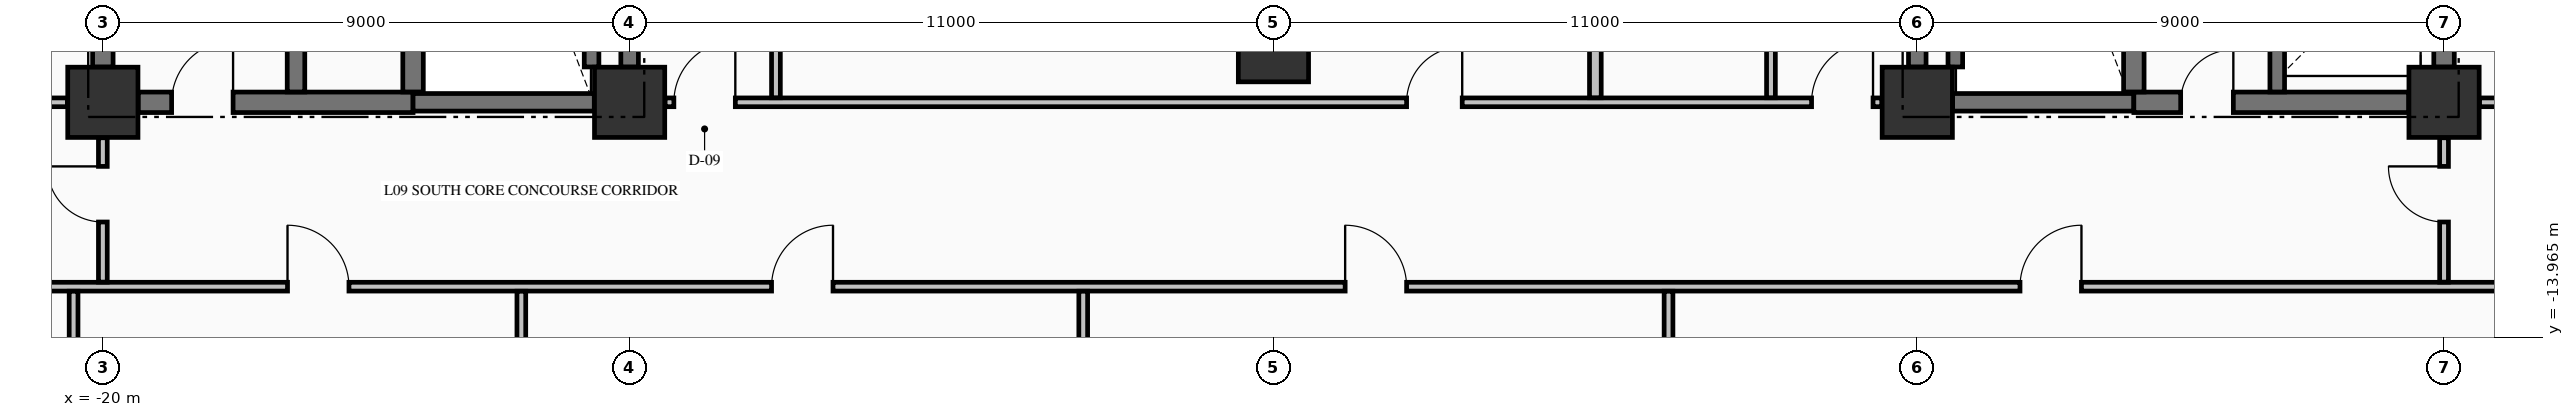
"""IFC4 building model, lengths in metres.
Left out: names, types, materials, properties, quantities, classifications, styles, units other than length and angle.
Written with IfcOpenShell. Run it as: python <this file> out.ifc"""

import sys

from ifc_helpers import new_model, si_unit, direction, frame, frame_2d, origin, origin_2d, place, context, subcontext, project, spatial, rectangle, extrude, element, fill, save


model = new_model("IFC4")
c1 = context("Model", 3, precision=1e-05, world=origin(), true_north=direction((0.0, 1.0)))
c2 = subcontext(c1, "Body", "Model", "MODEL_VIEW")
j1 = project(units=[si_unit("LENGTHUNIT", "METRE"), si_unit("PLANEANGLEUNIT", "RADIAN")], contexts=[c1])
p1 = place(None, origin())
s1 = spatial("IfcSite", under=j1, at=p1, CompositionType="ELEMENT")
p2 = place(p1, origin())
s2 = spatial("IfcBuilding", under=s1, at=p2, CompositionType="ELEMENT")
p3 = place(p2, frame((0.0, 0.0, 41.48)))
s3 = spatial("IfcBuildingStorey", under=s2, at=p3, CompositionType="ELEMENT", Elevation=41.48)
for number, where, z_axis, x_axis in (
    (1, (-20.0, -9.95, -0.25), (0.0, 0.0, 1.0), (1.0, 0.0, 0.0)),
    (2, (-11.0, -9.95, -0.25), (0.0, 0.0, 1.0), (1.0, 0.0, 0.0)),
    (3, (11.0, -9.95, -0.25), (0.0, 0.0, 1.0), (1.0, 0.0, 0.0)),
    (4, (20.0, -9.95, -0.25), (0.0, 0.0, 1.0), (1.0, 0.0, 0.0)),
    (5, (0.0, -9.0, -0.25), (0.0, 0.0, 1.0), (1.0, 0.0, 0.0)),
):
    element("IfcColumn", number, at=place(p3, frame(where, z_axis=z_axis, x_axis=x_axis)), inside=s3, PredefinedType="COLUMN", context=c2, shape_type="SweptSolid", body=[
        extrude(rectangle(XDim=1.2, YDim=1.2, at=origin_2d()), origin(), (0.0, 0.0, 1.0), 3.57),
    ])
p4 = place(p3, frame((-19.396, -9.95, 0.0), z_axis=(0.0, 0.0, 1.0), x_axis=(1.0, 0.0, 0.0)))
e6 = element("IfcWall", 6, at=p4, inside=s3, PredefinedType="SHEAR", context=c2, shape_type="SweptSolid", body=[
    extrude(rectangle(XDim=4.696, YDim=0.35, at=frame_2d((2.348, 0.0))), origin(), (0.0, 0.0, 1.0), 3.32),
])
p5 = place(p4, frame((0.571, 0.0, 0.0)))
e7 = element("IfcOpeningElement", 7, at=p5, cuts=e6, PredefinedType="OPENING", context=c2, shape_type="SweptSolid", body=[
    extrude(rectangle(XDim=1.05, YDim=2.15, at=frame_2d((0.525, 1.075))), frame((0.0, 0.185, 0.0), z_axis=(0.0, -1.0, 0.0), x_axis=(1.0, 0.0, 0.0)), (0.0, 0.0, 1.0), 0.37),
])
for number, where, z_axis, x_axis in (
    (8, (-14.7, -9.95, 0.0), (0.0, 0.0, 1.0), (1.0, 0.0, 0.0)),
    (9, (11.604, -9.95, 0.0), (0.0, 0.0, 1.0), (1.0, 0.0, 0.0)),
):
    element("IfcWall", number, at=place(p3, frame(where, z_axis=z_axis, x_axis=x_axis)), inside=s3, PredefinedType="SHEAR", context=c2, shape_type="SweptSolid", body=[
        extrude(rectangle(XDim=3.096, YDim=0.3, at=frame_2d((1.548, 0.0))), origin(), (0.0, 0.0, 1.0), 3.32),
    ])
p6 = place(p3, frame((14.7, -9.95, 0.0), z_axis=(0.0, 0.0, 1.0), x_axis=(1.0, 0.0, 0.0)))
e10 = element("IfcWall", 10, at=p6, inside=s3, PredefinedType="SHEAR", context=c2, shape_type="SweptSolid", body=[
    extrude(rectangle(XDim=4.696, YDim=0.35, at=frame_2d((2.348, 0.0))), origin(), (0.0, 0.0, 1.0), 3.32),
])
p7 = place(p6, frame((0.8, 0.0, 0.0)))
e11 = element("IfcOpeningElement", 11, at=p7, cuts=e10, PredefinedType="OPENING", context=c2, shape_type="SweptSolid", body=[
    extrude(rectangle(XDim=0.9, YDim=2.15, at=frame_2d((0.45, 1.075))), frame((0.0, 0.185, 0.0), z_axis=(0.0, -1.0, 0.0), x_axis=(1.0, 0.0, 0.0)), (0.0, 0.0, 1.0), 0.37),
])
p8 = place(p3, frame((-23.835, -13.1, 0.0), z_axis=(0.0, 0.0, 1.0), x_axis=(1.0, 0.0, 0.0)))
e12 = element("IfcWall", 12, at=p8, inside=s3, PredefinedType="PARTITIONING", context=c2, shape_type="SweptSolid", body=[
    extrude(rectangle(XDim=52.67, YDim=0.15, at=frame_2d((26.335, 0.0))), origin(), (0.0, 0.0, 1.0), 3.32),
])
p9 = place(p8, frame((6.99, 0.0, 0.0)))
e13 = element("IfcOpeningElement", 13, at=p9, cuts=e12, PredefinedType="OPENING", context=c2, shape_type="SweptSolid", body=[
    extrude(rectangle(XDim=1.05, YDim=2.15, at=frame_2d((0.525, 1.075))), frame((0.0, 0.085, 0.0), z_axis=(0.0, -1.0, 0.0), x_axis=(1.0, 0.0, 0.0)), (0.0, 0.0, 1.0), 0.17),
])
p10 = place(p8, frame((15.26, 0.0, 0.0)))
e14 = element("IfcOpeningElement", 14, at=p10, cuts=e12, PredefinedType="OPENING", context=c2, shape_type="SweptSolid", body=[
    extrude(rectangle(XDim=1.05, YDim=2.15, at=frame_2d((0.525, 1.075))), frame((0.0, 0.085, 0.0), z_axis=(0.0, -1.0, 0.0), x_axis=(1.0, 0.0, 0.0)), (0.0, 0.0, 1.0), 0.17),
])
p11 = place(p8, frame((25.06, 0.0, 0.0)))
e15 = element("IfcOpeningElement", 15, at=p11, cuts=e12, PredefinedType="OPENING", context=c2, shape_type="SweptSolid", body=[
    extrude(rectangle(XDim=1.05, YDim=2.15, at=frame_2d((0.525, 1.075))), frame((0.0, 0.085, 0.0), z_axis=(0.0, -1.0, 0.0), x_axis=(1.0, 0.0, 0.0)), (0.0, 0.0, 1.0), 0.17),
])
p12 = place(p8, frame((36.59, 0.0, 0.0)))
e16 = element("IfcOpeningElement", 16, at=p12, cuts=e12, PredefinedType="OPENING", context=c2, shape_type="SweptSolid", body=[
    extrude(rectangle(XDim=1.05, YDim=2.15, at=frame_2d((0.525, 1.075))), frame((0.0, 0.085, 0.0), z_axis=(0.0, -1.0, 0.0), x_axis=(1.0, 0.0, 0.0)), (0.0, 0.0, 1.0), 0.17),
])
p13 = place(p3, frame((-23.835, -9.95, 0.0), z_axis=(0.0, 0.0, 1.0), x_axis=(1.0, 0.0, 0.0)))
e17 = element("IfcWall", 17, at=p13, inside=s3, PredefinedType="PARTITIONING", context=c2, shape_type="SweptSolid", body=[
    extrude(rectangle(XDim=3.229, YDim=0.15, at=frame_2d((1.615, 0.0))), origin(), (0.0, 0.0, 1.0), 3.32),
])
p14 = place(p13, frame((1.36, 0.0, 0.0)))
e18 = element("IfcOpeningElement", 18, at=p14, cuts=e17, PredefinedType="OPENING", context=c2, shape_type="SweptSolid", body=[
    extrude(rectangle(XDim=0.95, YDim=2.15, at=frame_2d((0.475, 1.075))), frame((0.0, 0.085, 0.0), z_axis=(0.0, -1.0, 0.0), x_axis=(1.0, 0.0, 0.0)), (0.0, 0.0, 1.0), 0.17),
])
p15 = place(p3, frame((-10.394, -9.95, 0.0), z_axis=(0.0, 0.0, 1.0), x_axis=(1.0, 0.0, 0.0)))
e19 = element("IfcWall", 19, at=p15, inside=s3, PredefinedType="PARTITIONING", context=c2, shape_type="SweptSolid", body=[
    extrude(rectangle(XDim=20.788, YDim=0.15, at=frame_2d((10.394, 0.0))), origin(), (0.0, 0.0, 1.0), 3.32),
])
p16 = place(p15, frame((0.15, 0.0, 0.0)))
e20 = element("IfcOpeningElement", 20, at=p16, cuts=e19, PredefinedType="OPENING", context=c2, shape_type="SweptSolid", body=[
    extrude(rectangle(XDim=1.05, YDim=2.15, at=frame_2d((0.525, 1.075))), frame((0.0, 0.085, 0.0), z_axis=(0.0, -1.0, 0.0), x_axis=(1.0, 0.0, 0.0)), (0.0, 0.0, 1.0), 0.17),
])
p17 = place(p15, frame((19.588, 0.0, 0.0)))
e21 = element("IfcOpeningElement", 21, at=p17, cuts=e19, PredefinedType="OPENING", context=c2, shape_type="SweptSolid", body=[
    extrude(rectangle(XDim=1.05, YDim=2.15, at=frame_2d((0.525, 1.075))), frame((0.0, 0.085, 0.0), z_axis=(0.0, -1.0, 0.0), x_axis=(1.0, 0.0, 0.0)), (0.0, 0.0, 1.0), 0.17),
])
p18 = place(p15, frame((12.669, 0.0, 0.0)))
e22 = element("IfcOpeningElement", 22, at=p18, cuts=e19, PredefinedType="OPENING", context=c2, shape_type="SweptSolid", body=[
    extrude(rectangle(XDim=0.95, YDim=2.15, at=frame_2d((0.475, 1.075))), frame((0.0, 0.085, 0.0), z_axis=(0.0, -1.0, 0.0), x_axis=(1.0, 0.0, 0.0)), (0.0, 0.0, 1.0), 0.17),
])
p19 = place(p3, frame((20.606, -9.95, 0.0), z_axis=(0.0, 0.0, 1.0), x_axis=(1.0, 0.0, 0.0)))
e23 = element("IfcWall", 23, at=p19, inside=s3, PredefinedType="PARTITIONING", context=c2, shape_type="SweptSolid", body=[
    extrude(rectangle(XDim=8.229, YDim=0.15, at=frame_2d((4.115, 0.0))), origin(), (0.0, 0.0, 1.0), 3.32),
])
p20 = place(p19, frame((3.394, 0.0, 0.0)))
e24 = element("IfcOpeningElement", 24, at=p20, cuts=e23, PredefinedType="OPENING", context=c2, shape_type="SweptSolid", body=[
    extrude(rectangle(XDim=1.0, YDim=2.15, at=frame_2d((0.5, 1.075))), frame((0.0, 0.085, 0.0), z_axis=(0.0, -1.0, 0.0), x_axis=(1.0, 0.0, 0.0)), (0.0, 0.0, 1.0), 0.17),
])
p21 = place(p3, frame((-20.0, -9.346, 0.0), z_axis=(0.0, 0.0, 1.0), x_axis=(0.0, 1.0, 0.0)))
e25 = element("IfcWall", 25, at=p21, inside=s3, PredefinedType="SHEAR", context=c2, shape_type="SweptSolid", body=[
    extrude(rectangle(XDim=8.742, YDim=0.35, at=frame_2d((4.371, 0.0))), origin(), (0.0, 0.0, 1.0), 3.32),
])
p22 = place(p3, frame((-16.7, -9.773, 0.0), z_axis=(0.0, 0.0, 1.0), x_axis=(0.0, 1.0, 0.0)))
e26 = element("IfcWall", 26, at=p22, inside=s3, PredefinedType="SHEAR", context=c2, shape_type="SweptSolid", body=[
    extrude(rectangle(XDim=9.371, YDim=0.3, at=frame_2d((4.686, 0.0))), origin(), (0.0, 0.0, 1.0), 3.32),
])
p23 = place(p3, frame((-14.7, -9.773, 0.0), z_axis=(0.0, 0.0, 1.0), x_axis=(0.0, 1.0, 0.0)))
e27 = element("IfcWall", 27, at=p23, inside=s3, PredefinedType="SHEAR", context=c2, shape_type="SweptSolid", body=[
    extrude(rectangle(XDim=9.371, YDim=0.35, at=frame_2d((4.686, 0.0))), origin(), (0.0, 0.0, 1.0), 3.32),
])
p24 = place(p3, frame((-11.65, -9.346, 0.0), z_axis=(0.0, 0.0, 1.0), x_axis=(0.0, 1.0, 0.0)))
e28 = element("IfcWall", 28, at=p24, inside=s3, PredefinedType="SOLIDWALL", context=c2, shape_type="SweptSolid", body=[
    extrude(rectangle(XDim=8.742, YDim=0.25, at=frame_2d((4.371, 0.0))), origin(), (0.0, 0.0, 1.0), 3.32),
])
for number, where, z_axis, x_axis in (
    (29, (-11.0, -9.346, 0.0), (0.0, 0.0, 1.0), (0.0, 1.0, 0.0)),
    (30, (11.0, -9.346, 0.0), (0.0, 0.0, 1.0), (0.0, 1.0, 0.0)),
):
    element("IfcWall", number, at=place(p3, frame(where, z_axis=z_axis, x_axis=x_axis)), inside=s3, PredefinedType="SHEAR", context=c2, shape_type="SweptSolid", body=[
        extrude(rectangle(XDim=8.742, YDim=0.3, at=frame_2d((4.371, 0.0))), origin(), (0.0, 0.0, 1.0), 3.32),
    ])
p25 = place(p3, frame((11.65, -9.346, 0.0), z_axis=(0.0, 0.0, 1.0), x_axis=(0.0, 1.0, 0.0)))
e31 = element("IfcWall", 31, at=p25, inside=s3, PredefinedType="SOLIDWALL", context=c2, shape_type="SweptSolid", body=[
    extrude(rectangle(XDim=8.742, YDim=0.25, at=frame_2d((4.371, 0.0))), origin(), (0.0, 0.0, 1.0), 3.32),
])
p26 = place(p3, frame((14.7, -9.773, 0.0), z_axis=(0.0, 0.0, 1.0), x_axis=(0.0, 1.0, 0.0)))
e32 = element("IfcWall", 32, at=p26, inside=s3, PredefinedType="SHEAR", context=c2, shape_type="SweptSolid", body=[
    extrude(rectangle(XDim=9.371, YDim=0.35, at=frame_2d((4.686, 0.0))), origin(), (0.0, 0.0, 1.0), 3.32),
])
p27 = place(p3, frame((17.15, -9.773, 0.0), z_axis=(0.0, 0.0, 1.0), x_axis=(0.0, 1.0, 0.0)))
e33 = element("IfcWall", 33, at=p27, inside=s3, PredefinedType="SOLIDWALL", context=c2, shape_type="SweptSolid", body=[
    extrude(rectangle(XDim=2.596, YDim=0.25, at=frame_2d((1.298, 0.0))), origin(), (0.0, 0.0, 1.0), 3.32),
])
p28 = place(p3, frame((20.0, -9.346, 0.0), z_axis=(0.0, 0.0, 1.0), x_axis=(0.0, 1.0, 0.0)))
e34 = element("IfcWall", 34, at=p28, inside=s3, PredefinedType="SHEAR", context=c2, shape_type="SweptSolid", body=[
    extrude(rectangle(XDim=2.169, YDim=0.35, at=frame_2d((1.084, 0.0))), origin(), (0.0, 0.0, 1.0), 3.32),
])
p29 = place(p3, frame((-20.5, -22.294, 0.0), z_axis=(0.0, 0.0, 1.0), x_axis=(0.0, 1.0, 0.0)))
e35 = element("IfcWall", 35, at=p29, inside=s3, PredefinedType="PARTITIONING", context=c2, shape_type="SweptSolid", body=[
    extrude(rectangle(XDim=9.116, YDim=0.15, at=frame_2d((4.558, 0.0))), origin(), (0.0, 0.0, 1.0), 3.32),
])
p30 = place(p3, frame((-20.0, -13.022, 0.0), z_axis=(0.0, 0.0, 1.0), x_axis=(0.0, 1.0, 0.0)))
e36 = element("IfcWall", 36, at=p30, inside=s3, PredefinedType="PARTITIONING", context=c2, shape_type="SweptSolid", body=[
    extrude(rectangle(XDim=2.466, YDim=0.15, at=frame_2d((1.233, 0.0))), origin(), (0.0, 0.0, 1.0), 3.32),
])
p31 = place(p30, frame((1.027, 0.0, 0.0)))
e37 = element("IfcOpeningElement", 37, at=p31, cuts=e36, PredefinedType="OPENING", context=c2, shape_type="SweptSolid", body=[
    extrude(rectangle(XDim=0.95, YDim=2.15, at=frame_2d((0.475, 1.075))), frame((0.0, 0.085, 0.0), z_axis=(0.0, -1.0, 0.0), x_axis=(1.0, 0.0, 0.0)), (0.0, 0.0, 1.0), 0.17),
])
p32 = place(p3, frame((-12.85, -26.335, 0.0), z_axis=(0.0, 0.0, 1.0), x_axis=(0.0, 1.0, 0.0)))
e38 = element("IfcWall", 38, at=p32, inside=s3, PredefinedType="PARTITIONING", context=c2, shape_type="SweptSolid", body=[
    extrude(rectangle(XDim=13.157, YDim=0.15, at=frame_2d((6.579, 0.0))), origin(), (0.0, 0.0, 1.0), 3.32),
])
p33 = place(p3, frame((-8.5, -9.872, 0.0), z_axis=(0.0, 0.0, 1.0), x_axis=(0.0, 1.0, 0.0)))
e39 = element("IfcWall", 39, at=p33, inside=s3, PredefinedType="PARTITIONING", context=c2, shape_type="SweptSolid", body=[
    extrude(rectangle(XDim=13.369, YDim=0.15, at=frame_2d((6.685, 0.0))), origin(), (0.0, 0.0, 1.0), 3.32),
])
p34 = place(p33, frame((6.227, 0.0, 0.0)))
e40 = element("IfcOpeningElement", 40, at=p34, cuts=e39, PredefinedType="OPENING", context=c2, shape_type="SweptSolid", body=[
    extrude(rectangle(XDim=0.95, YDim=2.15, at=frame_2d((0.475, 1.075))), frame((0.0, 0.085, 0.0), z_axis=(0.0, -1.0, 0.0), x_axis=(1.0, 0.0, 0.0)), (0.0, 0.0, 1.0), 0.17),
])
p35 = place(p3, frame((-3.25, -26.335, 0.0), z_axis=(0.0, 0.0, 1.0), x_axis=(0.0, 1.0, 0.0)))
e41 = element("IfcWall", 41, at=p35, inside=s3, PredefinedType="PARTITIONING", context=c2, shape_type="SweptSolid", body=[
    extrude(rectangle(XDim=13.157, YDim=0.15, at=frame_2d((6.579, 0.0))), origin(), (0.0, 0.0, 1.0), 3.32),
])
p36 = place(p3, frame((5.5, -9.872, 0.0), z_axis=(0.0, 0.0, 1.0), x_axis=(0.0, 1.0, 0.0)))
e42 = element("IfcWall", 42, at=p36, inside=s3, PredefinedType="PARTITIONING", context=c2, shape_type="SweptSolid", body=[
    extrude(rectangle(XDim=4.969, YDim=0.2, at=frame_2d((2.484, 0.0))), origin(), (0.0, 0.0, 1.0), 3.32),
])
p37 = place(p3, frame((6.75, -26.335, 0.0), z_axis=(0.0, 0.0, 1.0), x_axis=(0.0, 1.0, 0.0)))
e43 = element("IfcWall", 43, at=p37, inside=s3, PredefinedType="PARTITIONING", context=c2, shape_type="SweptSolid", body=[
    extrude(rectangle(XDim=13.157, YDim=0.15, at=frame_2d((6.579, 0.0))), origin(), (0.0, 0.0, 1.0), 3.32),
])
p38 = place(p3, frame((8.5, -9.872, 0.0), z_axis=(0.0, 0.0, 1.0), x_axis=(0.0, 1.0, 0.0)))
e44 = element("IfcWall", 44, at=p38, inside=s3, PredefinedType="PARTITIONING", context=c2, shape_type="SweptSolid", body=[
    extrude(rectangle(XDim=4.969, YDim=0.15, at=frame_2d((2.484, 0.0))), origin(), (0.0, 0.0, 1.0), 3.32),
])
p39 = place(p38, frame((1.997, 0.0, 0.0)))
e45 = element("IfcOpeningElement", 45, at=p39, cuts=e44, PredefinedType="OPENING", context=c2, shape_type="SweptSolid", body=[
    extrude(rectangle(XDim=0.95, YDim=2.15, at=frame_2d((0.475, 1.075))), frame((0.0, 0.085, 0.0), z_axis=(0.0, -1.0, 0.0), x_axis=(1.0, 0.0, 0.0)), (0.0, 0.0, 1.0), 0.17),
])
p40 = place(p3, frame((20.0, -13.022, 0.0), z_axis=(0.0, 0.0, 1.0), x_axis=(0.0, 1.0, 0.0)))
e46 = element("IfcWall", 46, at=p40, inside=s3, PredefinedType="PARTITIONING", context=c2, shape_type="SweptSolid", body=[
    extrude(rectangle(XDim=2.466, YDim=0.15, at=frame_2d((1.233, 0.0))), origin(), (0.0, 0.0, 1.0), 2.66),
])
p41 = place(p40, frame((1.027, 0.0, 0.0)))
e47 = element("IfcOpeningElement", 47, at=p41, cuts=e46, PredefinedType="OPENING", context=c2, shape_type="SweptSolid", body=[
    extrude(rectangle(XDim=0.95, YDim=2.15, at=frame_2d((0.475, 1.075))), frame((0.0, 0.085, 0.0), z_axis=(0.0, -1.0, 0.0), x_axis=(1.0, 0.0, 0.0)), (0.0, 0.0, 1.0), 0.17),
])
p42 = place(p5, origin())
e48 = element("IfcDoor", 48, at=p42, inside=s3, OperationType="SINGLE_SWING_RIGHT", PredefinedType="DOOR", context=c2, shape_type="SweptSolid", body=[
    extrude(rectangle(XDim=1.05, YDim=2.15, at=frame_2d((0.525, 1.075))), frame((0.0, 0.025, 0.0), z_axis=(0.0, -1.0, 0.0), x_axis=(1.0, 0.0, 0.0)), (0.0, 0.0, 1.0), 0.05),
])
fill(e7, e48)
p43 = place(p7, origin())
e49 = element("IfcDoor", 49, at=p43, inside=s3, OperationType="SINGLE_SWING_RIGHT", PredefinedType="DOOR", context=c2, shape_type="SweptSolid", body=[
    extrude(rectangle(XDim=0.9, YDim=2.15, at=frame_2d((0.45, 1.075))), frame((0.0, 0.025, 0.0), z_axis=(0.0, -1.0, 0.0), x_axis=(1.0, 0.0, 0.0)), (0.0, 0.0, 1.0), 0.05),
])
fill(e11, e49)
p44 = place(p16, origin())
e50 = element("IfcDoor", 50, at=p44, inside=s3, OperationType="SINGLE_SWING_RIGHT", PredefinedType="DOOR", context=c2, shape_type="SweptSolid", body=[
    extrude(rectangle(XDim=1.05, YDim=2.15, at=frame_2d((0.525, 1.075))), frame((0.0, 0.025, 0.0), z_axis=(0.0, -1.0, 0.0), x_axis=(1.0, 0.0, 0.0)), (0.0, 0.0, 1.0), 0.05),
])
fill(e20, e50)
p45 = place(p17, origin())
e51 = element("IfcDoor", 51, at=p45, inside=s3, OperationType="SINGLE_SWING_RIGHT", PredefinedType="DOOR", context=c2, shape_type="SweptSolid", body=[
    extrude(rectangle(XDim=1.05, YDim=2.15, at=frame_2d((0.525, 1.075))), frame((0.0, 0.025, 0.0), z_axis=(0.0, -1.0, 0.0), x_axis=(1.0, 0.0, 0.0)), (0.0, 0.0, 1.0), 0.05),
])
fill(e21, e51)
p46 = place(p9, origin())
e52 = element("IfcDoor", 52, at=p46, inside=s3, OperationType="SINGLE_SWING_LEFT", PredefinedType="DOOR", context=c2, shape_type="SweptSolid", body=[
    extrude(rectangle(XDim=1.05, YDim=2.15, at=frame_2d((0.525, 1.075))), frame((0.0, 0.025, 0.0), z_axis=(0.0, -1.0, 0.0), x_axis=(1.0, 0.0, 0.0)), (0.0, 0.0, 1.0), 0.05),
])
fill(e13, e52)
p47 = place(p10, origin())
e53 = element("IfcDoor", 53, at=p47, inside=s3, OperationType="SINGLE_SWING_RIGHT", PredefinedType="DOOR", context=c2, shape_type="SweptSolid", body=[
    extrude(rectangle(XDim=1.05, YDim=2.15, at=frame_2d((0.525, 1.075))), frame((0.0, 0.025, 0.0), z_axis=(0.0, -1.0, 0.0), x_axis=(1.0, 0.0, 0.0)), (0.0, 0.0, 1.0), 0.05),
])
fill(e14, e53)
p48 = place(p11, origin())
e54 = element("IfcDoor", 54, at=p48, inside=s3, OperationType="SINGLE_SWING_LEFT", PredefinedType="DOOR", context=c2, shape_type="SweptSolid", body=[
    extrude(rectangle(XDim=1.05, YDim=2.15, at=frame_2d((0.525, 1.075))), frame((0.0, 0.025, 0.0), z_axis=(0.0, -1.0, 0.0), x_axis=(1.0, 0.0, 0.0)), (0.0, 0.0, 1.0), 0.05),
])
fill(e15, e54)
p49 = place(p12, origin())
e55 = element("IfcDoor", 55, at=p49, inside=s3, OperationType="SINGLE_SWING_RIGHT", PredefinedType="DOOR", context=c2, shape_type="SweptSolid", body=[
    extrude(rectangle(XDim=1.05, YDim=2.15, at=frame_2d((0.525, 1.075))), frame((0.0, 0.025, 0.0), z_axis=(0.0, -1.0, 0.0), x_axis=(1.0, 0.0, 0.0)), (0.0, 0.0, 1.0), 0.05),
])
fill(e16, e55)
p50 = place(p18, origin())
e56 = element("IfcDoor", 56, at=p50, inside=s3, OperationType="SINGLE_SWING_RIGHT", PredefinedType="DOOR", context=c2, shape_type="SweptSolid", body=[
    extrude(rectangle(XDim=0.95, YDim=2.15, at=frame_2d((0.475, 1.075))), frame((0.0, 0.025, 0.0), z_axis=(0.0, -1.0, 0.0), x_axis=(1.0, 0.0, 0.0)), (0.0, 0.0, 1.0), 0.05),
])
fill(e22, e56)
p51 = place(p31, origin())
e57 = element("IfcDoor", 57, at=p51, inside=s3, OperationType="SINGLE_SWING_RIGHT", PredefinedType="DOOR", context=c2, shape_type="SweptSolid", body=[
    extrude(rectangle(XDim=0.95, YDim=2.15, at=frame_2d((0.475, 1.075))), frame((0.0, 0.025, 0.0), z_axis=(0.0, -1.0, 0.0), x_axis=(1.0, 0.0, 0.0)), (0.0, 0.0, 1.0), 0.05),
])
fill(e37, e57)
p52 = place(p41, origin())
e58 = element("IfcDoor", 58, at=p52, inside=s3, OperationType="SINGLE_SWING_RIGHT", PredefinedType="DOOR", context=c2, shape_type="SweptSolid", body=[
    extrude(rectangle(XDim=0.95, YDim=2.15, at=frame_2d((0.475, 1.075))), frame((0.0, 0.025, 0.0), z_axis=(0.0, -1.0, 0.0), x_axis=(1.0, 0.0, 0.0)), (0.0, 0.0, 1.0), 0.05),
])
fill(e47, e58)
save(model, sys.argv[1])
